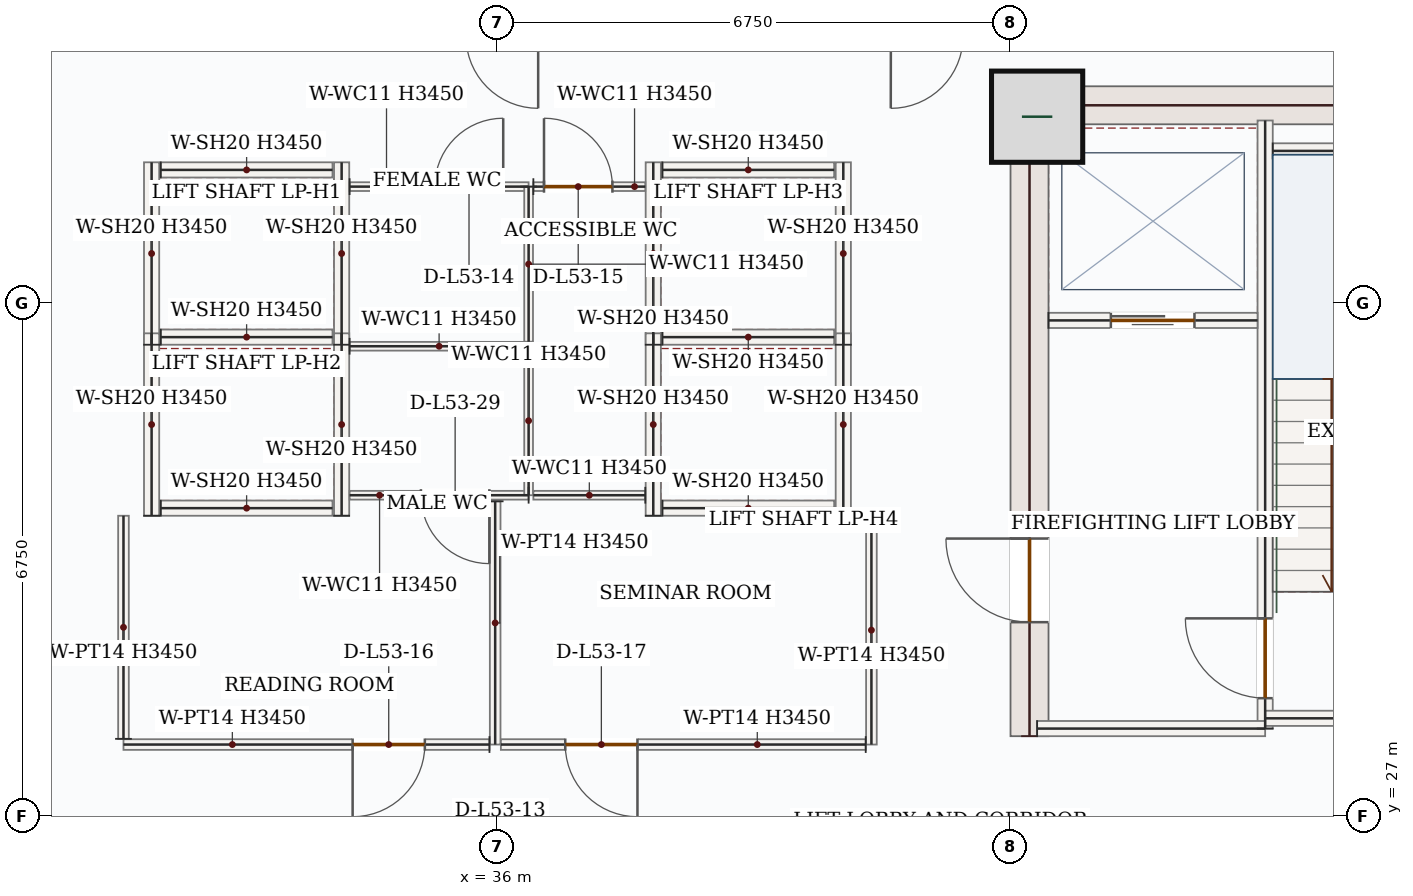
"""IFC4 building model, lengths in metres.
Left out: names, types, materials, properties, quantities, classifications, styles, units other than length and angle.
Written with IfcOpenShell. Run it as: python <this file> out.ifc"""

import sys

from ifc_helpers import new_model, si_unit, direction, frame, frame_2d, origin, origin_2d, place, context, subcontext, project, spatial, rectangle, extrude, source, transform, mapped, element, fill, save


model = new_model("IFC4")
c1 = context("Model", 3, precision=1e-05, world=origin(), true_north=direction((0.0, 1.0)))
c2 = subcontext(c1, "Body", "Model", "MODEL_VIEW")
j1 = project(units=[si_unit("LENGTHUNIT", "METRE"), si_unit("PLANEANGLEUNIT", "RADIAN")], contexts=[c1])
p1 = place(None, origin())
s1 = spatial("IfcSite", under=j1, at=p1, CompositionType="ELEMENT")
p2 = place(p1, origin())
s2 = spatial("IfcBuilding", under=s1, at=p2, CompositionType="ELEMENT")
p3 = place(p2, frame((0.0, 0.0, 225.3)))
s3 = spatial("IfcBuildingStorey", under=s2, at=p3, CompositionType="ELEMENT", Elevation=225.3)
p4 = place(p3, frame((43.0, 28.05, 0.0), z_axis=(0.0, 0.0, 1.0), x_axis=(0.0, 1.0, 0.0)))
e1 = element("IfcWall", 1, at=p4, inside=s3, PredefinedType="SHEAR", context=c2, shape_type="SweptSolid", body=[
    extrude(rectangle(XDim=8.55, YDim=0.5, at=frame_2d((4.275, 0.0))), origin(), (0.0, 0.0, 1.0), 3.45),
])
p5 = place(p4, frame((1.5, 0.0, 0.0)))
e2 = element("IfcOpeningElement", 2, at=p5, cuts=e1, PredefinedType="OPENING", context=c2, shape_type="SweptSolid", body=[
    extrude(rectangle(XDim=1.1, YDim=2.2, at=frame_2d((0.55, 1.1))), frame((0.0, 0.26, 0.0), z_axis=(0.0, -1.0, 0.0), x_axis=(1.0, 0.0, 0.0)), (0.0, 0.0, 1.0), 0.52),
])
m1 = source(origin(), c2, "Body", "SweptSolid", [
    extrude(rectangle(XDim=7.0, YDim=0.5, at=frame_2d((3.5, 0.0))), origin(), (0.0, 0.0, 1.0), 3.45),
])
p6 = place(p3, frame((43.25, 36.35, 0.0), z_axis=(0.0, 0.0, 1.0), x_axis=(1.0, 0.0, 0.0)))
e3 = element("IfcWall", 3, at=p6, inside=s3, PredefinedType="SHEAR", context=c2, shape_type="MappedRepresentation", body=[
    mapped(m1, transform((0.0, 0.0, 0.0), x_axis=(1.0, 0.0, 0.0), y_axis=(0.0, 1.0, 0.0), z_axis=(0.0, 0.0, 1.0), scale=1.0)),
])
m2 = source(origin(), c2, "Body", "SweptSolid", [
    extrude(rectangle(XDim=1.2, YDim=1.2, at=origin_2d()), origin(), (0.0, 0.0, 1.0), 3.9),
])
p7 = place(p3, frame((43.1, 36.2, 0.0), z_axis=(0.0, 0.0, 1.0), x_axis=(1.0, 0.0, 0.0)))
e4 = element("IfcColumn", 4, at=p7, inside=s3, PredefinedType="COLUMN", context=c2, shape_type="MappedRepresentation", body=[
    mapped(m2, transform((0.0, 0.0, 0.0), x_axis=(1.0, 0.0, 0.0), y_axis=(0.0, 1.0, 0.0), z_axis=(0.0, 0.0, 1.0), scale=1.0)),
])
p8 = place(p3, frame((46.1, 28.15, 0.0), z_axis=(0.0, 0.0, 1.0), x_axis=(0.0, 1.0, 0.0)))
e5 = element("IfcWall", 5, at=p8, inside=s3, PredefinedType="SOLIDWALL", context=c2, shape_type="SweptSolid", body=[
    extrude(rectangle(XDim=8.0, YDim=0.2, at=frame_2d((4.0, 0.0))), origin(), (0.0, 0.0, 1.0), 3.45),
])
p9 = place(p8, frame((0.4, 0.0, 0.0)))
e6 = element("IfcOpeningElement", 6, at=p9, cuts=e5, PredefinedType="OPENING", context=c2, shape_type="SweptSolid", body=[
    extrude(rectangle(XDim=1.05, YDim=2.15, at=frame_2d((0.525, 1.075))), frame((0.0, 0.11, 0.0), z_axis=(0.0, -1.0, 0.0), x_axis=(1.0, 0.0, 0.0)), (0.0, 0.0, 1.0), 0.22),
])
m3 = source(origin(), c2, "Body", "SweptSolid", [
    extrude(rectangle(XDim=3.0, YDim=0.2, at=frame_2d((1.5, 0.0))), origin(), (0.0, 0.0, 1.0), 3.45),
])
p10 = place(p3, frame((43.1, 28.15, 0.0), z_axis=(0.0, 0.0, 1.0), x_axis=(1.0, 0.0, 0.0)))
e7 = element("IfcWall", 7, at=p10, inside=s3, PredefinedType="SOLIDWALL", context=c2, shape_type="MappedRepresentation", body=[
    mapped(m3, transform((0.0, 0.0, 0.0), x_axis=(1.0, 0.0, 0.0), y_axis=(0.0, 1.0, 0.0), z_axis=(0.0, 0.0, 1.0), scale=1.0)),
])
m4 = source(origin(), c2, "Body", "SweptSolid", [
    extrude(rectangle(XDim=4.25, YDim=0.2, at=frame_2d((2.125, 0.0))), origin(), (0.0, 0.0, 1.0), 3.45),
])
p11 = place(p3, frame((46.1, 28.285, 0.0), z_axis=(0.0, 0.0, 1.0), x_axis=(1.0, 0.0, 0.0)))
e8 = element("IfcWall", 8, at=p11, inside=s3, PredefinedType="SOLIDWALL", context=c2, shape_type="MappedRepresentation", body=[
    mapped(m4, transform((0.0, 0.0, 0.0), x_axis=(1.0, 0.0, 0.0), y_axis=(0.0, 1.0, 0.0), z_axis=(0.0, 0.0, 1.0), scale=1.0)),
])
m5 = source(origin(), c2, "Body", "SweptSolid", [
    extrude(rectangle(XDim=3.25, YDim=0.2, at=frame_2d((1.625, 0.0))), origin(), (0.0, 0.0, 1.0), 3.45),
])
p12 = place(p3, frame((46.2, 35.75, 0.0), z_axis=(0.0, 0.0, 1.0), x_axis=(1.0, 0.0, 0.0)))
e9 = element("IfcWall", 9, at=p12, inside=s3, PredefinedType="SOLIDWALL", context=c2, shape_type="MappedRepresentation", body=[
    mapped(m5, transform((0.0, 0.0, 0.0), x_axis=(1.0, 0.0, 0.0), y_axis=(0.0, 1.0, 0.0), z_axis=(0.0, 0.0, 1.0), scale=1.0)),
])
p13 = place(p3, frame((43.25, 33.52, 0.0), z_axis=(0.0, 0.0, 1.0), x_axis=(1.0, 0.0, 0.0)))
e10 = element("IfcWall", 10, at=p13, inside=s3, PredefinedType="SOLIDWALL", context=c2, shape_type="SweptSolid", body=[
    extrude(rectangle(XDim=2.75, YDim=0.2, at=frame_2d((1.375, 0.0))), origin(), (0.0, 0.0, 1.0), 3.45),
])
p14 = place(p13, frame((0.82, 0.0, 0.0)))
e11 = element("IfcOpeningElement", 11, at=p14, cuts=e10, PredefinedType="OPENING", context=c2, shape_type="SweptSolid", body=[
    extrude(rectangle(XDim=1.1, YDim=2.15, at=frame_2d((0.55, 1.075))), frame((0.0, 0.11, 0.0), z_axis=(0.0, -1.0, 0.0), x_axis=(1.0, 0.0, 0.0)), (0.0, 0.0, 1.0), 0.22),
])
m6 = source(origin(), c2, "Body", "SweptSolid", [
    extrude(rectangle(XDim=2.4, YDim=0.2, at=frame_2d((1.2, 0.0))), origin(), (0.0, 0.0, 1.0), 3.45),
])
for number, where, z_axis, x_axis in (
    (12, (31.45, 33.2, 0.0), (0.0, 0.0, 1.0), (0.0, 1.0, 0.0)),
    (13, (33.95, 33.2, 0.0), (0.0, 0.0, 1.0), (0.0, 1.0, 0.0)),
):
    element("IfcWall", number, at=place(p3, frame(where, z_axis=z_axis, x_axis=x_axis)), inside=s3, PredefinedType="SOLIDWALL", context=c2, shape_type="MappedRepresentation", body=[
        mapped(m6, transform((0.0, 0.0, 0.0), x_axis=(1.0, 0.0, 0.0), y_axis=(0.0, 1.0, 0.0), z_axis=(0.0, 0.0, 1.0), scale=1.0)),
    ])
m7 = source(origin(), c2, "Body", "SweptSolid", [
    extrude(rectangle(XDim=2.26, YDim=0.2, at=frame_2d((1.13, 0.0))), origin(), (0.0, 0.0, 1.0), 3.45),
])
for number, where, z_axis, x_axis in (
    (14, (31.57, 33.3, 0.0), (0.0, 0.0, 1.0), (1.0, 0.0, 0.0)),
    (15, (31.57, 35.5, 0.0), (0.0, 0.0, 1.0), (1.0, 0.0, 0.0)),
):
    element("IfcWall", number, at=place(p3, frame(where, z_axis=z_axis, x_axis=x_axis)), inside=s3, PredefinedType="SOLIDWALL", context=c2, shape_type="MappedRepresentation", body=[
        mapped(m7, transform((0.0, 0.0, 0.0), x_axis=(1.0, 0.0, 0.0), y_axis=(0.0, 1.0, 0.0), z_axis=(0.0, 0.0, 1.0), scale=1.0)),
    ])
for number, where, z_axis, x_axis in (
    (16, (31.45, 30.95, 0.0), (0.0, 0.0, 1.0), (0.0, 1.0, 0.0)),
    (17, (33.95, 30.95, 0.0), (0.0, 0.0, 1.0), (0.0, 1.0, 0.0)),
):
    element("IfcWall", number, at=place(p3, frame(where, z_axis=z_axis, x_axis=x_axis)), inside=s3, PredefinedType="SOLIDWALL", context=c2, shape_type="MappedRepresentation", body=[
        mapped(m6, transform((0.0, 0.0, 0.0), x_axis=(1.0, 0.0, 0.0), y_axis=(0.0, 1.0, 0.0), z_axis=(0.0, 0.0, 1.0), scale=1.0)),
    ])
p15 = place(p3, frame((31.57, 31.05, 0.0), z_axis=(0.0, 0.0, 1.0), x_axis=(1.0, 0.0, 0.0)))
e18 = element("IfcWall", 18, at=p15, inside=s3, PredefinedType="SOLIDWALL", context=c2, shape_type="MappedRepresentation", body=[
    mapped(m7, transform((0.0, 0.0, 0.0), x_axis=(1.0, 0.0, 0.0), y_axis=(0.0, 1.0, 0.0), z_axis=(0.0, 0.0, 1.0), scale=1.0)),
])
for number, where, z_axis, x_axis in (
    (19, (38.05, 33.2, 0.0), (0.0, 0.0, 1.0), (0.0, 1.0, 0.0)),
    (20, (40.55, 33.2, 0.0), (0.0, 0.0, 1.0), (0.0, 1.0, 0.0)),
):
    element("IfcWall", number, at=place(p3, frame(where, z_axis=z_axis, x_axis=x_axis)), inside=s3, PredefinedType="SOLIDWALL", context=c2, shape_type="MappedRepresentation", body=[
        mapped(m6, transform((0.0, 0.0, 0.0), x_axis=(1.0, 0.0, 0.0), y_axis=(0.0, 1.0, 0.0), z_axis=(0.0, 0.0, 1.0), scale=1.0)),
    ])
for number, where, z_axis, x_axis in (
    (21, (38.17, 33.3, 0.0), (0.0, 0.0, 1.0), (1.0, 0.0, 0.0)),
    (22, (38.17, 35.5, 0.0), (0.0, 0.0, 1.0), (1.0, 0.0, 0.0)),
):
    element("IfcWall", number, at=place(p3, frame(where, z_axis=z_axis, x_axis=x_axis)), inside=s3, PredefinedType="SOLIDWALL", context=c2, shape_type="MappedRepresentation", body=[
        mapped(m7, transform((0.0, 0.0, 0.0), x_axis=(1.0, 0.0, 0.0), y_axis=(0.0, 1.0, 0.0), z_axis=(0.0, 0.0, 1.0), scale=1.0)),
    ])
for number, where, z_axis, x_axis in (
    (23, (38.05, 30.95, 0.0), (0.0, 0.0, 1.0), (0.0, 1.0, 0.0)),
    (24, (40.55, 30.95, 0.0), (0.0, 0.0, 1.0), (0.0, 1.0, 0.0)),
):
    element("IfcWall", number, at=place(p3, frame(where, z_axis=z_axis, x_axis=x_axis)), inside=s3, PredefinedType="SOLIDWALL", context=c2, shape_type="MappedRepresentation", body=[
        mapped(m6, transform((0.0, 0.0, 0.0), x_axis=(1.0, 0.0, 0.0), y_axis=(0.0, 1.0, 0.0), z_axis=(0.0, 0.0, 1.0), scale=1.0)),
    ])
p16 = place(p3, frame((38.17, 31.05, 0.0), z_axis=(0.0, 0.0, 1.0), x_axis=(1.0, 0.0, 0.0)))
e25 = element("IfcWall", 25, at=p16, inside=s3, PredefinedType="SOLIDWALL", context=c2, shape_type="MappedRepresentation", body=[
    mapped(m7, transform((0.0, 0.0, 0.0), x_axis=(1.0, 0.0, 0.0), y_axis=(0.0, 1.0, 0.0), z_axis=(0.0, 0.0, 1.0), scale=1.0)),
])
p17 = place(p3, frame((36.41, 31.22, 0.0), z_axis=(0.0, 0.0, 1.0), x_axis=(-1.0, 0.0, 0.0)))
e26 = element("IfcWall", 26, at=p17, inside=s3, PredefinedType="PARTITIONING", context=c2, shape_type="SweptSolid", body=[
    extrude(rectangle(XDim=2.355, YDim=0.115, at=frame_2d((1.177, 0.0))), origin(), (0.0, 0.0, 1.0), 3.45),
])
p18 = place(p17, frame((0.517, 0.0, 0.0)))
e27 = element("IfcOpeningElement", 27, at=p18, cuts=e26, PredefinedType="OPENING", context=c2, shape_type="SweptSolid", body=[
    extrude(rectangle(XDim=0.9, YDim=2.1, at=frame_2d((0.45, 1.05))), frame((0.0, 0.067, 0.0), z_axis=(0.0, -1.0, 0.0), x_axis=(1.0, 0.0, 0.0)), (0.0, 0.0, 1.0), 0.135),
])
m8 = source(origin(), c2, "Body", "SweptSolid", [
    extrude(rectangle(XDim=2.355, YDim=0.115, at=frame_2d((1.177, 0.0))), origin(), (0.0, 0.0, 1.0), 3.45),
])
p19 = place(p3, frame((34.055, 33.18, 0.0), z_axis=(0.0, 0.0, 1.0), x_axis=(1.0, 0.0, 0.0)))
e28 = element("IfcWall", 28, at=p19, inside=s3, PredefinedType="PARTITIONING", context=c2, shape_type="MappedRepresentation", body=[
    mapped(m8, transform((0.0, 0.0, 0.0), x_axis=(1.0, 0.0, 0.0), y_axis=(0.0, 1.0, 0.0), z_axis=(0.0, 0.0, 1.0), scale=1.0)),
])
m9 = source(origin(), c2, "Body", "SweptSolid", [
    extrude(rectangle(XDim=1.96, YDim=0.115, at=frame_2d((0.98, 0.0))), origin(), (0.0, 0.0, 1.0), 3.45),
])
p20 = place(p3, frame((36.41, 33.18, 0.0), z_axis=(0.0, 0.0, 1.0), x_axis=(0.0, -1.0, 0.0)))
e29 = element("IfcWall", 29, at=p20, inside=s3, PredefinedType="PARTITIONING", context=c2, shape_type="MappedRepresentation", body=[
    mapped(m9, transform((0.0, 0.0, 0.0), x_axis=(1.0, 0.0, 0.0), y_axis=(0.0, 1.0, 0.0), z_axis=(0.0, 0.0, 1.0), scale=1.0)),
])
p21 = place(p3, frame((34.055, 35.28, 0.0), z_axis=(0.0, 0.0, 1.0), x_axis=(1.0, 0.0, 0.0)))
e30 = element("IfcWall", 30, at=p21, inside=s3, PredefinedType="PARTITIONING", context=c2, shape_type="SweptSolid", body=[
    extrude(rectangle(XDim=2.355, YDim=0.115, at=frame_2d((1.177, 0.0))), origin(), (0.0, 0.0, 1.0), 3.45),
])
p22 = place(p21, frame((1.121, 0.0, 0.0)))
e31 = element("IfcOpeningElement", 31, at=p22, cuts=e30, PredefinedType="OPENING", context=c2, shape_type="SweptSolid", body=[
    extrude(rectangle(XDim=0.9, YDim=2.1, at=frame_2d((0.45, 1.05))), frame((0.0, 0.067, 0.0), z_axis=(0.0, -1.0, 0.0), x_axis=(1.0, 0.0, 0.0)), (0.0, 0.0, 1.0), 0.135),
])
m10 = source(origin(), c2, "Body", "SweptSolid", [
    extrude(rectangle(XDim=2.04, YDim=0.115, at=frame_2d((1.02, 0.0))), origin(), (0.0, 0.0, 1.0), 3.45),
])
p23 = place(p3, frame((36.41, 35.28, 0.0), z_axis=(0.0, 0.0, 1.0), x_axis=(0.0, -1.0, 0.0)))
e32 = element("IfcWall", 32, at=p23, inside=s3, PredefinedType="PARTITIONING", context=c2, shape_type="MappedRepresentation", body=[
    mapped(m10, transform((0.0, 0.0, 0.0), x_axis=(1.0, 0.0, 0.0), y_axis=(0.0, 1.0, 0.0), z_axis=(0.0, 0.0, 1.0), scale=1.0)),
])
m11 = source(origin(), c2, "Body", "SweptSolid", [
    extrude(rectangle(XDim=1.473, YDim=0.115, at=frame_2d((0.736, 0.0))), origin(), (0.0, 0.0, 1.0), 3.45),
])
p24 = place(p3, frame((37.945, 31.22, 0.0), z_axis=(0.0, 0.0, 1.0), x_axis=(-1.0, 0.0, 0.0)))
e33 = element("IfcWall", 33, at=p24, inside=s3, PredefinedType="PARTITIONING", context=c2, shape_type="MappedRepresentation", body=[
    mapped(m11, transform((0.0, 0.0, 0.0), x_axis=(1.0, 0.0, 0.0), y_axis=(0.0, 1.0, 0.0), z_axis=(0.0, 0.0, 1.0), scale=1.0)),
])
p25 = place(p3, frame((36.472, 35.28, 0.0), z_axis=(0.0, 0.0, 1.0), x_axis=(1.0, 0.0, 0.0)))
e34 = element("IfcWall", 34, at=p25, inside=s3, PredefinedType="PARTITIONING", context=c2, shape_type="SweptSolid", body=[
    extrude(rectangle(XDim=1.473, YDim=0.115, at=frame_2d((0.736, 0.0))), origin(), (0.0, 0.0, 1.0), 3.45),
])
p26 = place(p25, frame((0.14, 0.0, 0.0)))
e35 = element("IfcOpeningElement", 35, at=p26, cuts=e34, PredefinedType="OPENING", context=c2, shape_type="SweptSolid", body=[
    extrude(rectangle(XDim=0.9, YDim=2.1, at=frame_2d((0.45, 1.05))), frame((0.0, 0.067, 0.0), z_axis=(0.0, -1.0, 0.0), x_axis=(1.0, 0.0, 0.0)), (0.0, 0.0, 1.0), 0.135),
])
m12 = source(origin(), c2, "Body", "SweptSolid", [
    extrude(rectangle(XDim=3.2, YDim=0.14, at=frame_2d((1.6, 0.0))), origin(), (0.0, 0.0, 1.0), 3.45),
])
p27 = place(p3, frame((35.97, 31.14, 0.0), z_axis=(0.0, 0.0, 1.0), x_axis=(0.0, -1.0, 0.0)))
e36 = element("IfcWall", 36, at=p27, inside=s3, PredefinedType="PARTITIONING", context=c2, shape_type="MappedRepresentation", body=[
    mapped(m12, transform((0.0, 0.0, 0.0), x_axis=(1.0, 0.0, 0.0), y_axis=(0.0, 1.0, 0.0), z_axis=(0.0, 0.0, 1.0), scale=1.0)),
])
p28 = place(p3, frame((35.895, 27.94, 0.0), z_axis=(0.0, 0.0, 1.0), x_axis=(-1.0, 0.0, 0.0)))
e37 = element("IfcWall", 37, at=p28, inside=s3, PredefinedType="PARTITIONING", context=c2, shape_type="SweptSolid", body=[
    extrude(rectangle(XDim=4.815, YDim=0.14, at=frame_2d((2.407, 0.0))), origin(), (0.0, 0.0, 1.0), 3.45),
])
p29 = place(p28, frame((0.85, 0.0, 0.0)))
e38 = element("IfcOpeningElement", 38, at=p29, cuts=e37, PredefinedType="OPENING", context=c2, shape_type="SweptSolid", body=[
    extrude(rectangle(XDim=0.95, YDim=2.15, at=frame_2d((0.475, 1.075))), frame((0.0, 0.08, 0.0), z_axis=(0.0, -1.0, 0.0), x_axis=(1.0, 0.0, 0.0)), (0.0, 0.0, 1.0), 0.16),
])
m13 = source(origin(), c2, "Body", "SweptSolid", [
    extrude(rectangle(XDim=2.935, YDim=0.14, at=frame_2d((1.468, 0.0))), origin(), (0.0, 0.0, 1.0), 3.45),
])
p30 = place(p3, frame((31.08, 28.015, 0.0), z_axis=(0.0, 0.0, 1.0), x_axis=(0.0, 1.0, 0.0)))
e39 = element("IfcWall", 39, at=p30, inside=s3, PredefinedType="PARTITIONING", context=c2, shape_type="MappedRepresentation", body=[
    mapped(m13, transform((0.0, 0.0, 0.0), x_axis=(1.0, 0.0, 0.0), y_axis=(0.0, 1.0, 0.0), z_axis=(0.0, 0.0, 1.0), scale=1.0)),
])
m14 = source(origin(), c2, "Body", "SweptSolid", [
    extrude(rectangle(XDim=3.01, YDim=0.14, at=frame_2d((1.505, 0.0))), origin(), (0.0, 0.0, 1.0), 3.45),
])
p31 = place(p3, frame((40.92, 30.95, 0.0), z_axis=(0.0, 0.0, 1.0), x_axis=(0.0, -1.0, 0.0)))
e40 = element("IfcWall", 40, at=p31, inside=s3, PredefinedType="PARTITIONING", context=c2, shape_type="MappedRepresentation", body=[
    mapped(m14, transform((0.0, 0.0, 0.0), x_axis=(1.0, 0.0, 0.0), y_axis=(0.0, 1.0, 0.0), z_axis=(0.0, 0.0, 1.0), scale=1.0)),
])
p32 = place(p3, frame((40.845, 27.94, 0.0), z_axis=(0.0, 0.0, 1.0), x_axis=(-1.0, 0.0, 0.0)))
e41 = element("IfcWall", 41, at=p32, inside=s3, PredefinedType="PARTITIONING", context=c2, shape_type="SweptSolid", body=[
    extrude(rectangle(XDim=4.8, YDim=0.14, at=frame_2d((2.4, 0.0))), origin(), (0.0, 0.0, 1.0), 3.45),
])
p33 = place(p32, frame((3.003, 0.0, 0.0)))
e42 = element("IfcOpeningElement", 42, at=p33, cuts=e41, PredefinedType="OPENING", context=c2, shape_type="SweptSolid", body=[
    extrude(rectangle(XDim=0.95, YDim=2.15, at=frame_2d((0.475, 1.075))), frame((0.0, 0.08, 0.0), z_axis=(0.0, -1.0, 0.0), x_axis=(1.0, 0.0, 0.0)), (0.0, 0.0, 1.0), 0.16),
])
m15 = source(origin(), c2, "Body", "SweptSolid", [
    extrude(rectangle(XDim=1.05, YDim=2.15, at=frame_2d((0.525, 1.075))), frame((0.0, 0.025, 0.0), z_axis=(0.0, -1.0, 0.0), x_axis=(1.0, 0.0, 0.0)), (0.0, 0.0, 1.0), 0.05),
])
p34 = place(p9, origin())
e43 = element("IfcDoor", 43, at=p34, inside=s3, OperationType="SINGLE_SWING_RIGHT", PredefinedType="DOOR", context=c2, shape_type="MappedRepresentation", body=[
    mapped(m15, transform((0.0, 0.0, 0.0), x_axis=(1.0, 0.0, 0.0), y_axis=(0.0, 1.0, 0.0), z_axis=(0.0, 0.0, 1.0), scale=1.0)),
])
fill(e6, e43)
m16 = source(origin(), c2, "Body", "SweptSolid", [
    extrude(rectangle(XDim=1.1, YDim=2.15, at=frame_2d((0.55, 1.075))), frame((0.0, 0.025, 0.0), z_axis=(0.0, -1.0, 0.0), x_axis=(1.0, 0.0, 0.0)), (0.0, 0.0, 1.0), 0.05),
])
p35 = place(p14, origin())
e44 = element("IfcDoor", 44, at=p35, inside=s3, OperationType="DOUBLE_DOOR_SLIDING", PredefinedType="DOOR", context=c2, shape_type="MappedRepresentation", body=[
    mapped(m16, transform((0.0, 0.0, 0.0), x_axis=(1.0, 0.0, 0.0), y_axis=(0.0, 1.0, 0.0), z_axis=(0.0, 0.0, 1.0), scale=1.0)),
])
fill(e11, e44)
m17 = source(origin(), c2, "Body", "SweptSolid", [
    extrude(rectangle(XDim=1.1, YDim=2.2, at=frame_2d((0.55, 1.1))), frame((0.0, 0.025, 0.0), z_axis=(0.0, -1.0, 0.0), x_axis=(1.0, 0.0, 0.0)), (0.0, 0.0, 1.0), 0.05),
])
p36 = place(p5, origin())
e45 = element("IfcDoor", 45, at=p36, inside=s3, OperationType="SINGLE_SWING_RIGHT", PredefinedType="DOOR", context=c2, shape_type="MappedRepresentation", body=[
    mapped(m17, transform((0.0, 0.0, 0.0), x_axis=(1.0, 0.0, 0.0), y_axis=(0.0, 1.0, 0.0), z_axis=(0.0, 0.0, 1.0), scale=1.0)),
])
fill(e2, e45)
m18 = source(origin(), c2, "Body", "SweptSolid", [
    extrude(rectangle(XDim=0.9, YDim=2.1, at=frame_2d((0.45, 1.05))), frame((0.0, 0.025, 0.0), z_axis=(0.0, -1.0, 0.0), x_axis=(1.0, 0.0, 0.0)), (0.0, 0.0, 1.0), 0.05),
])
p37 = place(p22, origin())
e46 = element("IfcDoor", 46, at=p37, inside=s3, OperationType="SINGLE_SWING_RIGHT", PredefinedType="DOOR", context=c2, shape_type="MappedRepresentation", body=[
    mapped(m18, transform((0.0, 0.0, 0.0), x_axis=(1.0, 0.0, 0.0), y_axis=(0.0, 1.0, 0.0), z_axis=(0.0, 0.0, 1.0), scale=1.0)),
])
fill(e31, e46)
p38 = place(p26, origin())
e47 = element("IfcDoor", 47, at=p38, inside=s3, OperationType="SINGLE_SWING_LEFT", PredefinedType="DOOR", context=c2, shape_type="MappedRepresentation", body=[
    mapped(m18, transform((0.0, 0.0, 0.0), x_axis=(1.0, 0.0, 0.0), y_axis=(0.0, 1.0, 0.0), z_axis=(0.0, 0.0, 1.0), scale=1.0)),
])
fill(e35, e47)
m19 = source(origin(), c2, "Body", "SweptSolid", [
    extrude(rectangle(XDim=0.95, YDim=2.15, at=frame_2d((0.475, 1.075))), frame((0.0, 0.025, 0.0), z_axis=(0.0, -1.0, 0.0), x_axis=(1.0, 0.0, 0.0)), (0.0, 0.0, 1.0), 0.05),
])
p39 = place(p29, origin())
e48 = element("IfcDoor", 48, at=p39, inside=s3, OperationType="SINGLE_SWING_RIGHT", PredefinedType="DOOR", context=c2, shape_type="MappedRepresentation", body=[
    mapped(m19, transform((0.0, 0.0, 0.0), x_axis=(1.0, 0.0, 0.0), y_axis=(0.0, 1.0, 0.0), z_axis=(0.0, 0.0, 1.0), scale=1.0)),
])
fill(e38, e48)
p40 = place(p33, origin())
e49 = element("IfcDoor", 49, at=p40, inside=s3, OperationType="SINGLE_SWING_LEFT", PredefinedType="DOOR", context=c2, shape_type="MappedRepresentation", body=[
    mapped(m19, transform((0.0, 0.0, 0.0), x_axis=(1.0, 0.0, 0.0), y_axis=(0.0, 1.0, 0.0), z_axis=(0.0, 0.0, 1.0), scale=1.0)),
])
fill(e42, e49)
p41 = place(p18, origin())
e50 = element("IfcDoor", 50, at=p41, inside=s3, OperationType="SINGLE_SWING_LEFT", PredefinedType="DOOR", context=c2, shape_type="MappedRepresentation", body=[
    mapped(m18, transform((0.0, 0.0, 0.0), x_axis=(1.0, 0.0, 0.0), y_axis=(0.0, 1.0, 0.0), z_axis=(0.0, 0.0, 1.0), scale=1.0)),
])
fill(e27, e50)
save(model, sys.argv[1])
